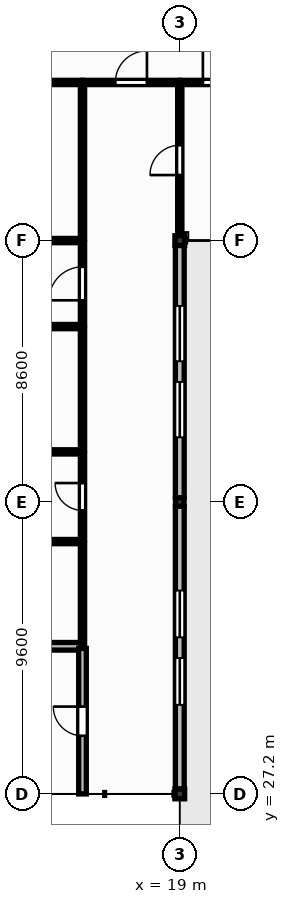
"""IFC4 building model, lengths in metres.
Left out: names, types, materials, properties, quantities, classifications, styles, units other than length and angle.
Written with IfcOpenShell. Run it as: python <this file> out.ifc"""

import sys

from ifc_helpers import new_model, si_unit, direction, frame, frame_2d, origin, origin_2d, place, context, subcontext, project, spatial, rectangle, extrude, element, fill, save


model = new_model("IFC4")
c1 = context("Model", 3, precision=1e-05, world=origin(), true_north=direction((0.0, 1.0)))
c2 = subcontext(c1, "Body", "Model", "MODEL_VIEW")
j1 = project(units=[si_unit("LENGTHUNIT", "METRE"), si_unit("PLANEANGLEUNIT", "RADIAN")], contexts=[c1])
p1 = place(None, origin())
s1 = spatial("IfcSite", under=j1, at=p1, CompositionType="ELEMENT")
p2 = place(p1, origin())
s2 = spatial("IfcBuilding", under=s1, at=p2, CompositionType="ELEMENT")
p3 = place(p2, frame((0.0, 0.0, 13.2)))
s3 = spatial("IfcBuildingStorey", under=s2, at=p3, CompositionType="ELEMENT", Elevation=13.2)
p4 = place(p3, frame((19.0, 27.2, 0.0), z_axis=(0.0, 0.0, 1.0), x_axis=(1.0, 0.0, 0.0)))
e1 = element("IfcColumn", 1, at=p4, inside=s3, PredefinedType="COLUMN", context=c2, shape_type="SweptSolid", body=[
    extrude(rectangle(XDim=0.32, YDim=0.32, at=origin_2d()), origin(), (0.0, 0.0, 1.0), 3.95),
])
p5 = place(p3, frame((19.0, 36.8, 0.0), z_axis=(0.0, 0.0, 1.0), x_axis=(1.0, 0.0, 0.0)))
e2 = element("IfcColumn", 2, at=p5, inside=s3, PredefinedType="COLUMN", context=c2, shape_type="SweptSolid", body=[
    extrude(rectangle(XDim=0.28, YDim=0.28, at=origin_2d()), origin(), (0.0, 0.0, 1.0), 3.95),
])
p6 = place(p3, frame((19.0, 45.4, 0.0), z_axis=(0.0, 0.0, 1.0), x_axis=(1.0, 0.0, 0.0)))
e3 = element("IfcColumn", 3, at=p6, inside=s3, PredefinedType="COLUMN", context=c2, shape_type="SweptSolid", body=[
    extrude(rectangle(XDim=0.32, YDim=0.32, at=origin_2d()), origin(), (0.0, 0.0, 1.0), 3.98),
])
p7 = place(p3, frame((19.0, 27.36, 0.0), z_axis=(0.0, 0.0, 1.0), x_axis=(0.0, 1.0, 0.0)))
e4 = element("IfcWall", 4, at=p7, inside=s3, PredefinedType="SOLIDWALL", context=c2, shape_type="SweptSolid", body=[
    extrude(rectangle(XDim=9.3, YDim=0.29, at=frame_2d((4.65, 0.0))), origin(), (0.0, 0.0, 1.0), 3.49),
])
p8 = place(p7, frame((2.77, 0.0, 1.05)))
e5 = element("IfcOpeningElement", 5, at=p8, cuts=e4, PredefinedType="OPENING", context=c2, shape_type="SweptSolid", body=[
    extrude(rectangle(XDim=1.54, YDim=1.65, at=frame_2d((0.77, 0.825))), frame((0.0, 0.155, 0.0), z_axis=(0.0, -1.0, 0.0), x_axis=(1.0, 0.0, 0.0)), (0.0, 0.0, 1.0), 0.31),
])
p9 = place(p7, frame((4.99, 0.0, 1.05)))
e6 = element("IfcOpeningElement", 6, at=p9, cuts=e4, PredefinedType="OPENING", context=c2, shape_type="SweptSolid", body=[
    extrude(rectangle(XDim=1.54, YDim=1.65, at=frame_2d((0.77, 0.825))), frame((0.0, 0.155, 0.0), z_axis=(0.0, -1.0, 0.0), x_axis=(1.0, 0.0, 0.0)), (0.0, 0.0, 1.0), 0.31),
])
p10 = place(p3, frame((19.0, 36.94, 0.0), z_axis=(0.0, 0.0, 1.0), x_axis=(0.0, 1.0, 0.0)))
e7 = element("IfcWall", 7, at=p10, inside=s3, PredefinedType="SOLIDWALL", context=c2, shape_type="SweptSolid", body=[
    extrude(rectangle(XDim=8.3, YDim=0.29, at=frame_2d((4.15, 0.0))), origin(), (0.0, 0.0, 1.0), 3.49),
])
p11 = place(p10, frame((1.99, 0.0, 1.05)))
e8 = element("IfcOpeningElement", 8, at=p11, cuts=e7, PredefinedType="OPENING", context=c2, shape_type="SweptSolid", body=[
    extrude(rectangle(XDim=1.82, YDim=1.65, at=frame_2d((0.91, 0.825))), frame((0.0, 0.155, 0.0), z_axis=(0.0, -1.0, 0.0), x_axis=(1.0, 0.0, 0.0)), (0.0, 0.0, 1.0), 0.31),
])
p12 = place(p10, frame((4.49, 0.0, 1.05)))
e9 = element("IfcOpeningElement", 9, at=p12, cuts=e7, PredefinedType="OPENING", context=c2, shape_type="SweptSolid", body=[
    extrude(rectangle(XDim=1.82, YDim=1.65, at=frame_2d((0.91, 0.825))), frame((0.0, 0.155, 0.0), z_axis=(0.0, -1.0, 0.0), x_axis=(1.0, 0.0, 0.0)), (0.0, 0.0, 1.0), 0.31),
])
p13 = place(p3, frame((11.8, 32.056, 0.0), z_axis=(0.0, 0.0, 1.0), x_axis=(1.0, 0.0, 0.0)))
e10 = element("IfcWall", 10, at=p13, inside=s3, PredefinedType="SOLIDWALL", context=c2, shape_type="SweptSolid", body=[
    extrude(rectangle(XDim=4.0, YDim=0.25, at=frame_2d((2.0, 0.0))), origin(), (0.0, 0.0, 1.0), 3.93),
])
p14 = place(p3, frame((11.8, 35.5, 0.0), z_axis=(0.0, 0.0, 1.0), x_axis=(1.0, 0.0, 0.0)))
e11 = element("IfcWall", 11, at=p14, inside=s3, PredefinedType="PARTITIONING", context=c2, shape_type="SweptSolid", body=[
    extrude(rectangle(XDim=4.0, YDim=0.14, at=frame_2d((2.0, 0.0))), origin(), (0.0, 0.0, 1.0), 3.93),
])
p15 = place(p14, frame((1.36, 0.0, 0.0)))
e12 = element("IfcOpeningElement", 12, at=p15, cuts=e11, PredefinedType="OPENING", context=c2, shape_type="SweptSolid", body=[
    extrude(rectangle(XDim=1.28, YDim=2.2, at=frame_2d((0.64, 1.1))), frame((0.0, 0.08, 0.0), z_axis=(0.0, -1.0, 0.0), x_axis=(1.0, 0.0, 0.0)), (0.0, 0.0, 1.0), 0.16),
])
p16 = place(p3, frame((11.8, 38.45, 0.0), z_axis=(0.0, 0.0, 1.0), x_axis=(1.0, 0.0, 0.0)))
e13 = element("IfcWall", 13, at=p16, inside=s3, PredefinedType="PARTITIONING", context=c2, shape_type="SweptSolid", body=[
    extrude(rectangle(XDim=4.0, YDim=0.14, at=frame_2d((2.0, 0.0))), origin(), (0.0, 0.0, 1.0), 3.93),
])
p17 = place(p16, frame((1.51, 0.0, 0.0)))
e14 = element("IfcOpeningElement", 14, at=p17, cuts=e13, PredefinedType="OPENING", context=c2, shape_type="SweptSolid", body=[
    extrude(rectangle(XDim=0.98, YDim=2.15, at=frame_2d((0.49, 1.075))), frame((0.0, 0.08, 0.0), z_axis=(0.0, -1.0, 0.0), x_axis=(1.0, 0.0, 0.0)), (0.0, 0.0, 1.0), 0.16),
])
p18 = place(p3, frame((11.8, 42.571, 0.0), z_axis=(0.0, 0.0, 1.0), x_axis=(1.0, 0.0, 0.0)))
e15 = element("IfcWall", 15, at=p18, inside=s3, PredefinedType="PARTITIONING", context=c2, shape_type="SweptSolid", body=[
    extrude(rectangle(XDim=4.0, YDim=0.14, at=frame_2d((2.0, 0.0))), origin(), (0.0, 0.0, 1.0), 3.93),
])
p19 = place(p3, frame((11.94, 45.4, 0.0), z_axis=(0.0, 0.0, 1.0), x_axis=(1.0, 0.0, 0.0)))
e16 = element("IfcWall", 16, at=p19, inside=s3, PredefinedType="PARTITIONING", context=c2, shape_type="SweptSolid", body=[
    extrude(rectangle(XDim=3.86, YDim=0.14, at=frame_2d((1.93, 0.0))), origin(), (0.0, 0.0, 1.0), 3.52),
])
p20 = place(p3, frame((11.8, 50.6, 0.0), z_axis=(0.0, 0.0, 1.0), x_axis=(1.0, 0.0, 0.0)))
e17 = element("IfcWall", 17, at=p20, inside=s3, PredefinedType="PARTITIONING", context=c2, shape_type="SweptSolid", body=[
    extrude(rectangle(XDim=4.0, YDim=0.14, at=frame_2d((2.0, 0.0))), origin(), (0.0, 0.0, 1.0), 3.93),
])
p21 = place(p20, frame((1.17, 0.0, 0.0)))
e18 = element("IfcOpeningElement", 18, at=p21, cuts=e17, PredefinedType="OPENING", context=c2, shape_type="SweptSolid", body=[
    extrude(rectangle(XDim=1.66, YDim=2.3, at=frame_2d((0.83, 1.15))), frame((0.0, 0.08, 0.0), z_axis=(0.0, -1.0, 0.0), x_axis=(1.0, 0.0, 0.0)), (0.0, 0.0, 1.0), 0.16),
])
p22 = place(p3, frame((15.8, 27.2, 0.0), z_axis=(0.0, 0.0, 1.0), x_axis=(0.0, 1.0, 0.0)))
e19 = element("IfcWall", 19, at=p22, inside=s3, PredefinedType="SOLIDWALL", context=c2, shape_type="SweptSolid", body=[
    extrude(rectangle(XDim=4.786, YDim=0.25, at=frame_2d((2.393, 0.0))), origin(), (0.0, 0.0, 1.0), 3.93),
])
p23 = place(p22, frame((1.913, 0.0, 0.0)))
e20 = element("IfcOpeningElement", 20, at=p23, cuts=e19, PredefinedType="OPENING", context=c2, shape_type="SweptSolid", body=[
    extrude(rectangle(XDim=0.96, YDim=2.1, at=frame_2d((0.48, 1.05))), frame((0.0, 0.135, 0.0), z_axis=(0.0, -1.0, 0.0), x_axis=(1.0, 0.0, 0.0)), (0.0, 0.0, 1.0), 0.27),
])
p24 = place(p3, frame((15.8, 32.126, 0.0), z_axis=(0.0, 0.0, 1.0), x_axis=(0.0, 1.0, 0.0)))
e21 = element("IfcWall", 21, at=p24, inside=s3, PredefinedType="PARTITIONING", context=c2, shape_type="SweptSolid", body=[
    extrude(rectangle(XDim=3.304, YDim=0.14, at=frame_2d((1.652, 0.0))), origin(), (0.0, 0.0, 1.0), 3.93),
])
p25 = place(p3, frame((15.8, 35.57, 0.0), z_axis=(0.0, 0.0, 1.0), x_axis=(0.0, 1.0, 0.0)))
e22 = element("IfcWall", 22, at=p25, inside=s3, PredefinedType="PARTITIONING", context=c2, shape_type="SweptSolid", body=[
    extrude(rectangle(XDim=2.81, YDim=0.14, at=frame_2d((1.405, 0.0))), origin(), (0.0, 0.0, 1.0), 3.93),
])
p26 = place(p25, frame((0.955, 0.0, 0.0)))
e23 = element("IfcOpeningElement", 23, at=p26, cuts=e22, PredefinedType="OPENING", context=c2, shape_type="SweptSolid", body=[
    extrude(rectangle(XDim=0.9, YDim=2.1, at=frame_2d((0.45, 1.05))), frame((0.0, 0.08, 0.0), z_axis=(0.0, -1.0, 0.0), x_axis=(1.0, 0.0, 0.0)), (0.0, 0.0, 1.0), 0.16),
])
p27 = place(p3, frame((15.8, 38.52, 0.0), z_axis=(0.0, 0.0, 1.0), x_axis=(0.0, 1.0, 0.0)))
e24 = element("IfcWall", 24, at=p27, inside=s3, PredefinedType="PARTITIONING", context=c2, shape_type="SweptSolid", body=[
    extrude(rectangle(XDim=3.981, YDim=0.14, at=frame_2d((1.99, 0.0))), origin(), (0.0, 0.0, 1.0), 3.93),
])
p28 = place(p3, frame((15.8, 42.641, 0.0), z_axis=(0.0, 0.0, 1.0), x_axis=(0.0, 1.0, 0.0)))
e25 = element("IfcWall", 25, at=p28, inside=s3, PredefinedType="PARTITIONING", context=c2, shape_type="SweptSolid", body=[
    extrude(rectangle(XDim=2.689, YDim=0.14, at=frame_2d((1.344, 0.0))), origin(), (0.0, 0.0, 1.0), 3.93),
])
p29 = place(p28, frame((0.794, 0.0, 0.0)))
e26 = element("IfcOpeningElement", 26, at=p29, cuts=e25, PredefinedType="OPENING", context=c2, shape_type="SweptSolid", body=[
    extrude(rectangle(XDim=1.1, YDim=2.1, at=frame_2d((0.55, 1.05))), frame((0.0, 0.08, 0.0), z_axis=(0.0, -1.0, 0.0), x_axis=(1.0, 0.0, 0.0)), (0.0, 0.0, 1.0), 0.16),
])
p30 = place(p3, frame((15.8, 45.47, 0.0), z_axis=(0.0, 0.0, 1.0), x_axis=(0.0, 1.0, 0.0)))
e27 = element("IfcWall", 27, at=p30, inside=s3, PredefinedType="PARTITIONING", context=c2, shape_type="SweptSolid", body=[
    extrude(rectangle(XDim=5.06, YDim=0.14, at=frame_2d((2.53, 0.0))), origin(), (0.0, 0.0, 1.0), 3.93),
])
p31 = place(p3, frame((15.8, 50.6, 0.0), z_axis=(0.0, 0.0, 1.0), x_axis=(1.0, 0.0, 0.0)))
e28 = element("IfcWall", 28, at=p31, inside=s3, PredefinedType="PARTITIONING", context=c2, shape_type="SweptSolid", body=[
    extrude(rectangle(XDim=3.2, YDim=0.14, at=frame_2d((1.6, 0.0))), origin(), (0.0, 0.0, 1.0), 3.93),
])
p32 = place(p31, frame((1.08, 0.0, 0.0)))
e29 = element("IfcOpeningElement", 29, at=p32, cuts=e28, PredefinedType="OPENING", context=c2, shape_type="SweptSolid", body=[
    extrude(rectangle(XDim=1.04, YDim=2.1, at=frame_2d((0.52, 1.05))), frame((0.0, 0.08, 0.0), z_axis=(0.0, -1.0, 0.0), x_axis=(1.0, 0.0, 0.0)), (0.0, 0.0, 1.0), 0.16),
])
p33 = place(p3, frame((19.0, 45.56, 0.0), z_axis=(0.0, 0.0, 1.0), x_axis=(0.0, 1.0, 0.0)))
e30 = element("IfcWall", 30, at=p33, inside=s3, PredefinedType="PARTITIONING", context=c2, shape_type="SweptSolid", body=[
    extrude(rectangle(XDim=4.97, YDim=0.14, at=frame_2d((2.485, 0.0))), origin(), (0.0, 0.0, 1.0), 3.46),
])
p34 = place(p33, frame((1.995, 0.0, 0.0)))
e31 = element("IfcOpeningElement", 31, at=p34, cuts=e30, PredefinedType="OPENING", context=c2, shape_type="SweptSolid", body=[
    extrude(rectangle(XDim=0.98, YDim=2.15, at=frame_2d((0.49, 1.075))), frame((0.0, 0.08, 0.0), z_axis=(0.0, -1.0, 0.0), x_axis=(1.0, 0.0, 0.0)), (0.0, 0.0, 1.0), 0.16),
])
p35 = place(p3, frame((19.0, 50.6, 0.0), z_axis=(0.0, 0.0, 1.0), x_axis=(1.0, 0.0, 0.0)))
e32 = element("IfcWall", 32, at=p35, inside=s3, PredefinedType="PARTITIONING", context=c2, shape_type="SweptSolid", body=[
    extrude(rectangle(XDim=2.8, YDim=0.14, at=frame_2d((1.4, 0.0))), origin(), (0.0, 0.0, 1.0), 3.93),
])
p36 = place(p35, frame((0.76, 0.0, 0.0)))
e33 = element("IfcOpeningElement", 33, at=p36, cuts=e32, PredefinedType="OPENING", context=c2, shape_type="SweptSolid", body=[
    extrude(rectangle(XDim=1.28, YDim=2.2, at=frame_2d((0.64, 1.1))), frame((0.0, 0.08, 0.0), z_axis=(0.0, -1.0, 0.0), x_axis=(1.0, 0.0, 0.0)), (0.0, 0.0, 1.0), 0.16),
])
p37 = place(p8, origin())
e34 = element("IfcWindow", 34, at=p37, inside=s3, PartitioningType="DOUBLE_PANEL_VERTICAL", PredefinedType="WINDOW", context=c2, shape_type="SweptSolid", body=[
    extrude(rectangle(XDim=1.54, YDim=1.65, at=frame_2d((0.77, 0.825))), frame((0.0, 0.03, 0.0), z_axis=(0.0, -1.0, 0.0), x_axis=(1.0, 0.0, 0.0)), (0.0, 0.0, 1.0), 0.06),
])
fill(e5, e34)
p38 = place(p9, origin())
e35 = element("IfcWindow", 35, at=p38, inside=s3, PartitioningType="DOUBLE_PANEL_VERTICAL", PredefinedType="WINDOW", context=c2, shape_type="SweptSolid", body=[
    extrude(rectangle(XDim=1.54, YDim=1.65, at=frame_2d((0.77, 0.825))), frame((0.0, 0.03, 0.0), z_axis=(0.0, -1.0, 0.0), x_axis=(1.0, 0.0, 0.0)), (0.0, 0.0, 1.0), 0.06),
])
fill(e6, e35)
p39 = place(p11, origin())
e36 = element("IfcWindow", 36, at=p39, inside=s3, PartitioningType="DOUBLE_PANEL_VERTICAL", PredefinedType="WINDOW", context=c2, shape_type="SweptSolid", body=[
    extrude(rectangle(XDim=1.82, YDim=1.65, at=frame_2d((0.91, 0.825))), frame((0.0, 0.03, 0.0), z_axis=(0.0, -1.0, 0.0), x_axis=(1.0, 0.0, 0.0)), (0.0, 0.0, 1.0), 0.06),
])
fill(e8, e36)
p40 = place(p12, origin())
e37 = element("IfcWindow", 37, at=p40, inside=s3, PartitioningType="DOUBLE_PANEL_VERTICAL", PredefinedType="WINDOW", context=c2, shape_type="SweptSolid", body=[
    extrude(rectangle(XDim=1.82, YDim=1.65, at=frame_2d((0.91, 0.825))), frame((0.0, 0.03, 0.0), z_axis=(0.0, -1.0, 0.0), x_axis=(1.0, 0.0, 0.0)), (0.0, 0.0, 1.0), 0.06),
])
fill(e9, e37)
p41 = place(p32, origin())
e38 = element("IfcDoor", 38, at=p41, inside=s3, OperationType="SINGLE_SWING_RIGHT", PredefinedType="DOOR", context=c2, shape_type="SweptSolid", body=[
    extrude(rectangle(XDim=1.04, YDim=2.1, at=frame_2d((0.52, 1.05))), frame((0.0, 0.025, 0.0), z_axis=(0.0, -1.0, 0.0), x_axis=(1.0, 0.0, 0.0)), (0.0, 0.0, 1.0), 0.05),
])
fill(e29, e38)
p42 = place(p36, origin())
e39 = element("IfcDoor", 39, at=p42, inside=s3, OperationType="SINGLE_SWING_LEFT", PredefinedType="DOOR", context=c2, shape_type="SweptSolid", body=[
    extrude(rectangle(XDim=1.28, YDim=2.2, at=frame_2d((0.64, 1.1))), frame((0.0, 0.025, 0.0), z_axis=(0.0, -1.0, 0.0), x_axis=(1.0, 0.0, 0.0)), (0.0, 0.0, 1.0), 0.05),
])
fill(e33, e39)
p43 = place(p26, origin())
e40 = element("IfcDoor", 40, at=p43, inside=s3, OperationType="SINGLE_SWING_RIGHT", PredefinedType="DOOR", context=c2, shape_type="SweptSolid", body=[
    extrude(rectangle(XDim=0.9, YDim=2.1, at=frame_2d((0.45, 1.05))), frame((0.0, 0.025, 0.0), z_axis=(0.0, -1.0, 0.0), x_axis=(1.0, 0.0, 0.0)), (0.0, 0.0, 1.0), 0.05),
])
fill(e23, e40)
p44 = place(p34, origin())
e41 = element("IfcDoor", 41, at=p44, inside=s3, OperationType="SINGLE_SWING_LEFT", PredefinedType="DOOR", context=c2, shape_type="SweptSolid", body=[
    extrude(rectangle(XDim=0.98, YDim=2.15, at=frame_2d((0.49, 1.075))), frame((0.0, 0.025, 0.0), z_axis=(0.0, -1.0, 0.0), x_axis=(1.0, 0.0, 0.0)), (0.0, 0.0, 1.0), 0.05),
])
fill(e31, e41)
p45 = place(p23, origin())
e42 = element("IfcDoor", 42, at=p45, inside=s3, OperationType="SINGLE_SWING_RIGHT", PredefinedType="DOOR", context=c2, shape_type="SweptSolid", body=[
    extrude(rectangle(XDim=0.96, YDim=2.1, at=frame_2d((0.48, 1.05))), frame((0.0, 0.025, 0.0), z_axis=(0.0, -1.0, 0.0), x_axis=(1.0, 0.0, 0.0)), (0.0, 0.0, 1.0), 0.05),
])
fill(e20, e42)
p46 = place(p29, origin())
e43 = element("IfcDoor", 43, at=p46, inside=s3, OperationType="SINGLE_SWING_LEFT", PredefinedType="DOOR", context=c2, shape_type="SweptSolid", body=[
    extrude(rectangle(XDim=1.1, YDim=2.1, at=frame_2d((0.55, 1.05))), frame((0.0, 0.025, 0.0), z_axis=(0.0, -1.0, 0.0), x_axis=(1.0, 0.0, 0.0)), (0.0, 0.0, 1.0), 0.05),
])
fill(e26, e43)
save(model, sys.argv[1])
